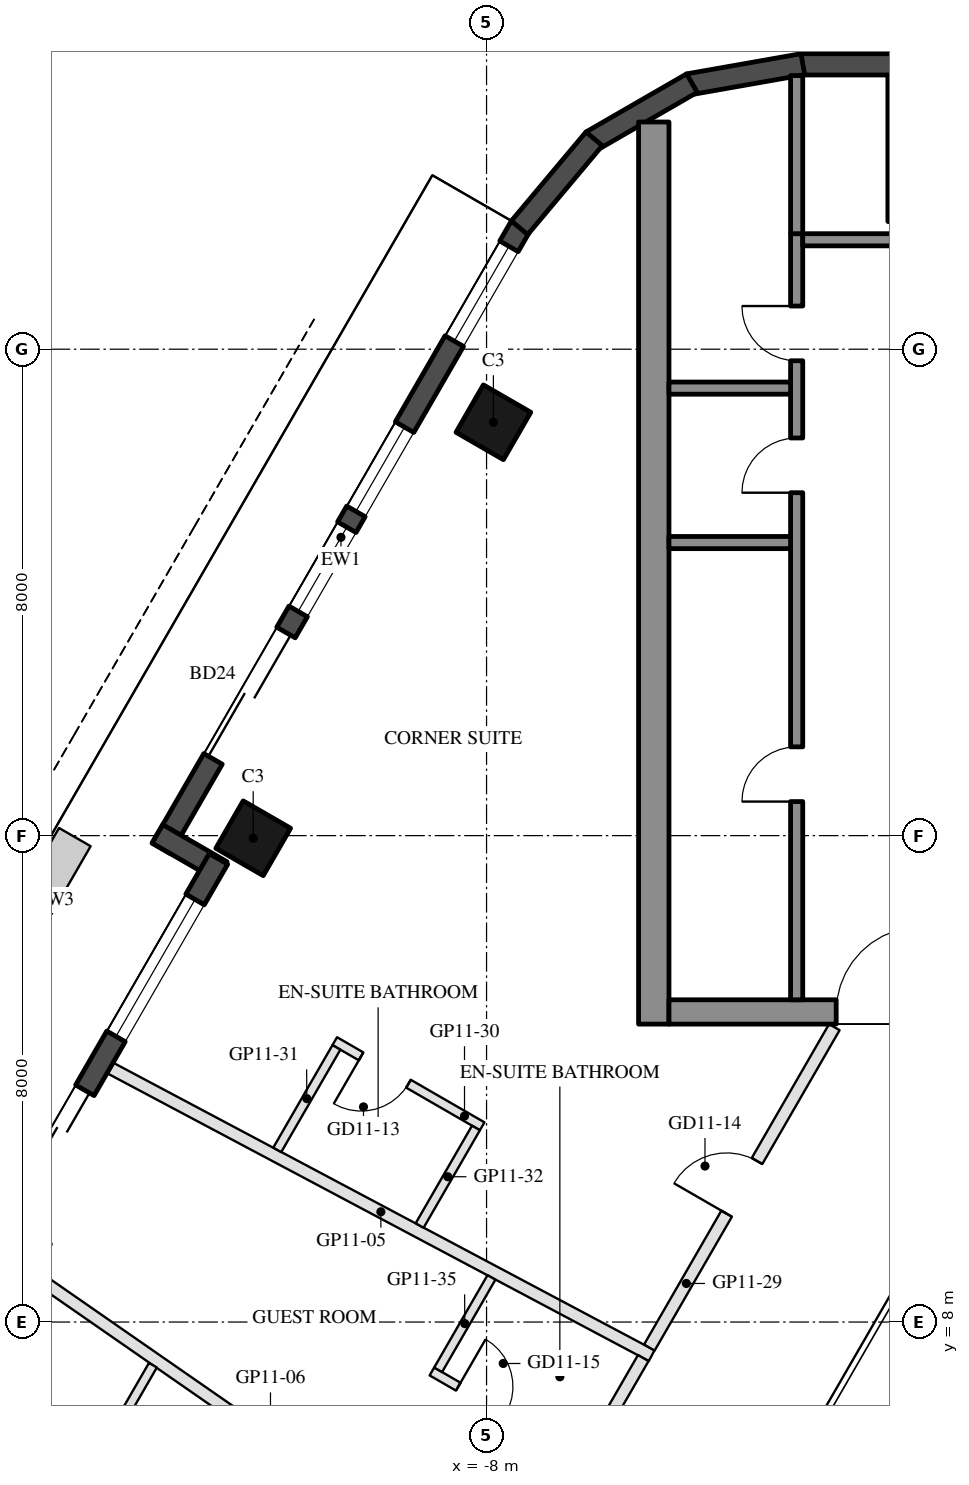
"""IFC4 building model, lengths in metres.
Left out: names, types, materials, properties, quantities, classifications, styles, units other than length and angle.
Written with IfcOpenShell. Run it as: python <this file> out.ifc"""

import sys

from ifc_helpers import new_model, si_unit, direction, frame, frame_2d, origin, origin_2d, place, context, subcontext, project, spatial, rectangle, hollow_rectangle, extrude, element, fill, save


model = new_model("IFC4")
c1 = context("Model", 3, precision=1e-05, world=origin(), true_north=direction((0.0, 1.0)))
c2 = subcontext(c1, "Body", "Model", "MODEL_VIEW")
j1 = project(units=[si_unit("LENGTHUNIT", "METRE"), si_unit("PLANEANGLEUNIT", "RADIAN")], contexts=[c1])
p1 = place(None, origin())
s1 = spatial("IfcSite", under=j1, at=p1, CompositionType="ELEMENT")
p2 = place(p1, origin())
s2 = spatial("IfcBuilding", under=s1, at=p2, CompositionType="ELEMENT")
p3 = place(p2, frame((0.0, 0.0, 124.2)))
s3 = spatial("IfcBuildingStorey", under=s2, at=p3, CompositionType="ELEMENT", Elevation=124.2)
for number, where, z_axis, x_axis in (
    (1, (-7.888, 22.798, 0.0), (0.0, 0.0, 1.0), (0.5, 0.866, 0.0)),
    (2, (-11.838, 15.957, 0.0), (0.0, 0.0, 1.0), (0.5, 0.866, 0.0)),
):
    element("IfcColumn", number, at=place(p3, frame(where, z_axis=z_axis, x_axis=x_axis)), inside=s3, PredefinedType="COLUMN", context=c2, shape_type="SweptSolid", body=[
        extrude(hollow_rectangle(XDim=0.9, YDim=0.9, WallThickness=0.04, at=origin_2d()), origin(), (0.0, 0.0, 1.0), 3.7),
    ])
p4 = place(p3, frame((0.0, 27.3, 0.0), z_axis=(0.0, 0.0, 1.0), x_axis=(1.0, 0.0, 0.0)))
e3 = element("IfcColumn", 3, at=p4, inside=s3, PredefinedType="COLUMN", context=c2, shape_type="SweptSolid", body=[
    extrude(hollow_rectangle(XDim=2.8, YDim=2.4, WallThickness=0.07, at=origin_2d()), origin(), (0.0, 0.0, 1.0), 3.7),
])
p5 = place(p3, frame((-7.441, 26.022, 0.0), z_axis=(0.0, 0.0, 1.0), x_axis=(-0.499992533062, -0.86602971478, 0.0)))
e4 = element("IfcWall", 4, at=p5, inside=s3, PredefinedType="SOLIDWALL", context=c2, shape_type="SweptSolid", body=[
    extrude(rectangle(XDim=11.816, YDim=0.35, at=frame_2d((5.908, 0.0))), origin(), (0.0, 0.0, 1.0), 3.55),
])
p6 = place(p5, frame((0.381, 0.0, 0.3)))
e5 = element("IfcOpeningElement", 5, at=p6, cuts=e4, PredefinedType="OPENING", context=c2, shape_type="SweptSolid", body=[
    extrude(rectangle(XDim=1.8, YDim=2.65, at=frame_2d((0.9, 1.325))), frame((0.0, 0.185, 0.0), z_axis=(0.0, -1.0, 0.0), x_axis=(1.0, 0.0, 0.0)), (0.0, 0.0, 1.0), 0.37),
])
p7 = place(p5, frame((7.716, 0.0, 0.0)))
e6 = element("IfcOpeningElement", 6, at=p7, cuts=e4, PredefinedType="OPENING", context=c2, shape_type="SweptSolid", body=[
    extrude(rectangle(XDim=2.4, YDim=2.4, at=frame_2d((1.2, 1.2))), frame((0.0, 0.185, 0.0), z_axis=(0.0, -1.0, 0.0), x_axis=(1.0, 0.0, 0.0)), (0.0, 0.0, 1.0), 0.37),
])
p8 = place(p5, frame((3.815, 0.0, 0.3)))
e7 = element("IfcOpeningElement", 7, at=p8, cuts=e4, PredefinedType="OPENING", context=c2, shape_type="SweptSolid", body=[
    extrude(rectangle(XDim=1.6, YDim=2.65, at=frame_2d((0.8, 1.325))), frame((0.0, 0.185, 0.0), z_axis=(0.0, -1.0, 0.0), x_axis=(1.0, 0.0, 0.0)), (0.0, 0.0, 1.0), 0.37),
])
p9 = place(p5, frame((5.715, 0.0, 0.3)))
e8 = element("IfcOpeningElement", 8, at=p9, cuts=e4, PredefinedType="OPENING", context=c2, shape_type="SweptSolid", body=[
    extrude(rectangle(XDim=1.6, YDim=2.65, at=frame_2d((0.8, 1.325))), frame((0.0, 0.185, 0.0), z_axis=(0.0, -1.0, 0.0), x_axis=(1.0, 0.0, 0.0)), (0.0, 0.0, 1.0), 0.37),
])
p10 = place(p3, frame((-13.413, 16.029, 0.0), z_axis=(0.0, 0.0, 1.0), x_axis=(0.866005645448, -0.500034220881, 0.0)))
e9 = element("IfcWall", 9, at=p10, inside=s3, PredefinedType="SOLIDWALL", context=c2, shape_type="SweptSolid", body=[
    extrude(rectangle(XDim=1.22, YDim=0.35, at=frame_2d((0.61, 0.0))), origin(), (0.0, 0.0, 1.0), 3.55),
])
p11 = place(p3, frame((-12.409, 15.617, 0.0), z_axis=(0.0, 0.0, 1.0), x_axis=(-0.500003597184, -0.866023326939, 0.0)))
e10 = element("IfcWall", 10, at=p11, inside=s3, PredefinedType="SOLIDWALL", context=c2, shape_type="SweptSolid", body=[
    extrude(rectangle(XDim=6.74, YDim=0.35, at=frame_2d((3.37, 0.0))), origin(), (0.0, 0.0, 1.0), 3.55),
])
p12 = place(p11, frame((0.77, 0.0, 0.3)))
e11 = element("IfcOpeningElement", 11, at=p12, cuts=e10, PredefinedType="OPENING", context=c2, shape_type="SweptSolid", body=[
    extrude(rectangle(XDim=2.6, YDim=2.65, at=frame_2d((1.3, 1.325))), frame((0.0, 0.185, 0.0), z_axis=(0.0, -1.0, 0.0), x_axis=(1.0, 0.0, 0.0)), (0.0, 0.0, 1.0), 0.37),
])
p13 = place(p11, frame((4.394, 0.0, 0.0)))
e12 = element("IfcOpeningElement", 12, at=p13, cuts=e10, PredefinedType="OPENING", context=c2, shape_type="SweptSolid", body=[
    extrude(rectangle(XDim=1.5, YDim=2.4, at=frame_2d((0.75, 1.2))), frame((0.0, 0.185, 0.0), z_axis=(0.0, -1.0, 0.0), x_axis=(1.0, 0.0, 0.0)), (0.0, 0.0, 1.0), 0.37),
])
p14 = place(p3, frame((2.829, 28.685, 0.0), z_axis=(0.0, 0.0, 1.0), x_axis=(-1.0, 0.0, 0.0)))
e13 = element("IfcWall", 13, at=p14, inside=s3, PredefinedType="SOLIDWALL", context=c2, shape_type="SweptSolid", body=[
    extrude(rectangle(XDim=5.658, YDim=0.35, at=frame_2d((2.829, 0.0))), origin(), (0.0, 0.0, 1.0), 3.55),
])
for number, where, z_axis, x_axis in (
    (14, (-2.799, 28.688, 0.0), (0.0, 0.0, 1.0), (-0.985, -0.174, 0.0)),
    (15, (-4.623, 28.377, 0.0), (0.0, 0.0, 1.0), (-0.866, -0.5, 0.0)),
):
    element("IfcWall", number, at=place(p3, frame(where, z_axis=z_axis, x_axis=x_axis)), inside=s3, PredefinedType="SOLIDWALL", context=c2, shape_type="SweptSolid", body=[
        extrude(rectangle(XDim=1.91, YDim=0.35, at=frame_2d((0.955, 0.0))), origin(), (0.0, 0.0, 1.0), 3.55),
    ])
p15 = place(p3, frame((-6.23, 27.461, 0.0), z_axis=(0.0, 0.0, 1.0), x_axis=(-0.642808304945, -0.766027077259, 0.0)))
e16 = element("IfcWall", 16, at=p15, inside=s3, PredefinedType="SOLIDWALL", context=c2, shape_type="SweptSolid", body=[
    extrude(rectangle(XDim=1.91, YDim=0.35, at=frame_2d((0.955, 0.0))), origin(), (0.0, 0.0, 1.0), 3.55),
])
p16 = place(p3, frame((-5.25, 12.9, 0.0), z_axis=(0.0, 0.0, 1.0), x_axis=(0.0, 1.0, 0.0)))
e17 = element("IfcWall", 17, at=p16, inside=s3, PredefinedType="SHEAR", context=c2, shape_type="SweptSolid", body=[
    extrude(rectangle(XDim=14.837, YDim=0.5, at=frame_2d((7.418, 0.0))), origin(), (0.0, 0.0, 1.0), 3.5),
])
p17 = place(p3, frame((5.0, 13.1, 0.0), z_axis=(0.0, 0.0, 1.0), x_axis=(-1.0, 0.0, 0.0)))
e18 = element("IfcWall", 18, at=p17, inside=s3, PredefinedType="SHEAR", context=c2, shape_type="SweptSolid", body=[
    extrude(rectangle(XDim=10.0, YDim=0.4, at=frame_2d((5.0, 0.0))), origin(), (0.0, 0.0, 1.0), 3.5),
])
p18 = place(p17, frame((3.55, 0.0, 0.0)))
e19 = element("IfcOpeningElement", 19, at=p18, cuts=e18, PredefinedType="OPENING", context=c2, shape_type="SweptSolid", body=[
    extrude(rectangle(XDim=1.1, YDim=2.1, at=frame_2d((0.55, 1.05))), frame((0.0, 0.21, 0.0), z_axis=(0.0, -1.0, 0.0), x_axis=(1.0, 0.0, 0.0)), (0.0, 0.0, 1.0), 0.42),
])
p19 = place(p17, frame((5.85, 0.0, 0.0)))
e20 = element("IfcOpeningElement", 20, at=p19, cuts=e18, PredefinedType="OPENING", context=c2, shape_type="SweptSolid", body=[
    extrude(rectangle(XDim=1.4, YDim=2.1, at=frame_2d((0.7, 1.05))), frame((0.0, 0.21, 0.0), z_axis=(0.0, -1.0, 0.0), x_axis=(1.0, 0.0, 0.0)), (0.0, 0.0, 1.0), 0.42),
])
p20 = place(p3, frame((-2.9, 13.3, 0.0), z_axis=(0.0, 0.0, 1.0), x_axis=(0.0, 1.0, 0.0)))
e21 = element("IfcWall", 21, at=p20, inside=s3, PredefinedType="SHEAR", context=c2, shape_type="SweptSolid", body=[
    extrude(rectangle(XDim=12.6, YDim=0.2, at=frame_2d((6.3, 0.0))), origin(), (0.0, 0.0, 1.0), 3.5),
])
p21 = place(p20, frame((3.26, 0.0, 0.0)))
e22 = element("IfcOpeningElement", 22, at=p21, cuts=e21, PredefinedType="OPENING", context=c2, shape_type="SweptSolid", body=[
    extrude(rectangle(XDim=0.9, YDim=2.1, at=frame_2d((0.45, 1.05))), frame((0.0, 0.11, 0.0), z_axis=(0.0, -1.0, 0.0), x_axis=(1.0, 0.0, 0.0)), (0.0, 0.0, 1.0), 0.22),
])
p22 = place(p20, frame((8.34, 0.0, 0.0)))
e23 = element("IfcOpeningElement", 23, at=p22, cuts=e21, PredefinedType="OPENING", context=c2, shape_type="SweptSolid", body=[
    extrude(rectangle(XDim=0.9, YDim=2.1, at=frame_2d((0.45, 1.05))), frame((0.0, 0.11, 0.0), z_axis=(0.0, -1.0, 0.0), x_axis=(1.0, 0.0, 0.0)), (0.0, 0.0, 1.0), 0.22),
])
p23 = place(p20, frame((10.51, 0.0, 0.0)))
e24 = element("IfcOpeningElement", 24, at=p23, cuts=e21, PredefinedType="OPENING", context=c2, shape_type="SweptSolid", body=[
    extrude(rectangle(XDim=0.9, YDim=2.1, at=frame_2d((0.45, 1.05))), frame((0.0, 0.11, 0.0), z_axis=(0.0, -1.0, 0.0), x_axis=(1.0, 0.0, 0.0)), (0.0, 0.0, 1.0), 0.22),
])
p24 = place(p3, frame((-0.4, 25.8, 0.0), z_axis=(0.0, 0.0, 1.0), x_axis=(-1.0, 0.0, 0.0)))
e25 = element("IfcWall", 25, at=p24, inside=s3, PredefinedType="SHEAR", context=c2, shape_type="SweptSolid", body=[
    extrude(rectangle(XDim=2.4, YDim=0.2, at=frame_2d((1.2, 0.0))), origin(), (0.0, 0.0, 1.0), 3.5),
])
for number, where, z_axis, x_axis in (
    (26, (-3.0, 20.82, 0.0), (0.0, 0.0, 1.0), (-1.0, 0.0, 0.0)),
    (27, (-3.0, 23.36, 0.0), (0.0, 0.0, 1.0), (-1.0, 0.0, 0.0)),
):
    element("IfcWall", number, at=place(p3, frame(where, z_axis=z_axis, x_axis=x_axis)), inside=s3, PredefinedType="SHEAR", context=c2, shape_type="SweptSolid", body=[
        extrude(rectangle(XDim=2.0, YDim=0.2, at=frame_2d((1.0, 0.0))), origin(), (0.0, 0.0, 1.0), 3.5),
    ])
p25 = place(p3, frame((-2.9, 25.9, 0.0), z_axis=(0.0, 0.0, 1.0), x_axis=(0.0, 1.0, 0.0)))
e28 = element("IfcWall", 28, at=p25, inside=s3, PredefinedType="SHEAR", context=c2, shape_type="SweptSolid", body=[
    extrude(rectangle(XDim=2.6, YDim=0.2, at=frame_2d((1.3, 0.0))), origin(), (0.0, 0.0, 1.0), 3.5),
])
p26 = place(p3, frame((-14.192, 12.179, 0.0), z_axis=(0.0, 0.0, 1.0), x_axis=(0.883106944183, -0.469171743753, 0.0)))
e29 = element("IfcWall", 29, at=p26, inside=s3, PredefinedType="PARTITIONING", context=c2, shape_type="SweptSolid", body=[
    extrude(rectangle(XDim=10.086, YDim=0.2, at=frame_2d((5.043, 0.0))), origin(), (0.0, 0.0, 1.0), 2.95),
])
p27 = place(p3, frame((-15.46, 8.781, 0.0), z_axis=(0.0, 0.0, 1.0), x_axis=(0.82142273434, -0.570319815113, 0.0)))
e30 = element("IfcWall", 30, at=p27, inside=s3, PredefinedType="PARTITIONING", context=c2, shape_type="SweptSolid", body=[
    extrude(rectangle(XDim=9.513, YDim=0.2, at=frame_2d((4.756, 0.0))), origin(), (0.0, 0.0, 1.0), 2.95),
])
p28 = place(p3, frame((-5.323, 7.581, 0.0), z_axis=(0.0, 0.0, 1.0), x_axis=(0.49998410452, 0.866034580849, 0.0)))
e31 = element("IfcWall", 31, at=p28, inside=s3, PredefinedType="PARTITIONING", context=c2, shape_type="SweptSolid", body=[
    extrude(rectangle(XDim=6.085, YDim=0.2, at=frame_2d((3.042, 0.0))), origin(), (0.0, 0.0, 1.0), 2.95),
])
p29 = place(p28, frame((2.542, 0.0, 0.0)))
e32 = element("IfcOpeningElement", 32, at=p29, cuts=e31, PredefinedType="OPENING", context=c2, shape_type="SweptSolid", body=[
    extrude(rectangle(XDim=1.0, YDim=2.1, at=frame_2d((0.5, 1.05))), frame((0.0, 0.11, 0.0), z_axis=(0.0, -1.0, 0.0), x_axis=(1.0, 0.0, 0.0)), (0.0, 0.0, 1.0), 0.22),
])
p30 = place(p3, frame((-8.072, 11.219, 0.0), z_axis=(0.0, 0.0, 1.0), x_axis=(-0.866034573852, 0.49998411664, 0.0)))
e33 = element("IfcWall", 33, at=p30, inside=s3, PredefinedType="PARTITIONING", context=c2, shape_type="SweptSolid", body=[
    extrude(rectangle(XDim=2.8, YDim=0.15, at=frame_2d((1.4, 0.0))), origin(), (0.0, 0.0, 1.0), 3.55),
])
p31 = place(p30, frame((1.4, 0.0, 0.0)))
e34 = element("IfcOpeningElement", 34, at=p31, cuts=e33, PredefinedType="OPENING", context=c2, shape_type="SweptSolid", body=[
    extrude(rectangle(XDim=0.9, YDim=2.1, at=frame_2d((0.45, 1.05))), frame((0.0, 0.085, 0.0), z_axis=(0.0, -1.0, 0.0), x_axis=(1.0, 0.0, 0.0)), (0.0, 0.0, 1.0), 0.17),
])
p32 = place(p3, frame((-10.469, 12.517, 0.0), z_axis=(0.0, 0.0, 1.0), x_axis=(-0.500051850797, -0.865995465643, 0.0)))
e35 = element("IfcWall", 35, at=p32, inside=s3, PredefinedType="PARTITIONING", context=c2, shape_type="SweptSolid", body=[
    extrude(rectangle(XDim=1.946, YDim=0.15, at=frame_2d((0.973, 0.0))), origin(), (0.0, 0.0, 1.0), 2.95),
])
p33 = place(p3, frame((-8.174, 11.192, 0.0), z_axis=(0.0, 0.0, 1.0), x_axis=(-0.500022870649, -0.866012199007, 0.0)))
e36 = element("IfcWall", 36, at=p33, inside=s3, PredefinedType="PARTITIONING", context=c2, shape_type="SweptSolid", body=[
    extrude(rectangle(XDim=1.853, YDim=0.15, at=frame_2d((0.926, 0.0))), origin(), (0.0, 0.0, 1.0), 2.95),
])
p34 = place(p3, frame((-7.679, 3.5, 0.0), z_axis=(0.0, 0.0, 1.0), x_axis=(0.500026934738, 0.866009852448, 0.0)))
e37 = element("IfcWall", 37, at=p34, inside=s3, PredefinedType="PARTITIONING", context=c2, shape_type="SweptSolid", body=[
    extrude(rectangle(XDim=4.511, YDim=0.2, at=frame_2d((2.256, 0.0))), origin(), (0.0, 0.0, 1.0), 2.95),
])
p35 = place(p34, frame((1.058, 0.0, 0.0)))
e38 = element("IfcOpeningElement", 38, at=p35, cuts=e37, PredefinedType="OPENING", context=c2, shape_type="SweptSolid", body=[
    extrude(rectangle(XDim=1.0, YDim=2.1, at=frame_2d((0.5, 1.05))), frame((0.0, 0.11, 0.0), z_axis=(0.0, -1.0, 0.0), x_axis=(1.0, 0.0, 0.0)), (0.0, 0.0, 1.0), 0.22),
])
p36 = place(p3, frame((-8.899, 7.187, 0.0), z_axis=(0.0, 0.0, 1.0), x_axis=(0.866056369097, -0.49994636267, 0.0)))
e39 = element("IfcWall", 39, at=p36, inside=s3, PredefinedType="PARTITIONING", context=c2, shape_type="SweptSolid", body=[
    extrude(rectangle(XDim=2.8, YDim=0.15, at=frame_2d((1.4, 0.0))), origin(), (0.0, 0.0, 1.0), 3.55),
])
p37 = place(p36, frame((0.5, 0.0, 0.0)))
e40 = element("IfcOpeningElement", 40, at=p37, cuts=e39, PredefinedType="OPENING", context=c2, shape_type="SweptSolid", body=[
    extrude(rectangle(XDim=0.9, YDim=2.1, at=frame_2d((0.45, 1.05))), frame((0.0, 0.085, 0.0), z_axis=(0.0, -1.0, 0.0), x_axis=(1.0, 0.0, 0.0)), (0.0, 0.0, 1.0), 0.17),
])
p38 = place(p3, frame((-7.919, 8.734, 0.0), z_axis=(0.0, 0.0, 1.0), x_axis=(-0.499971461383, -0.866041879935, 0.0)))
e41 = element("IfcWall", 41, at=p38, inside=s3, PredefinedType="PARTITIONING", context=c2, shape_type="SweptSolid", body=[
    extrude(rectangle(XDim=1.754, YDim=0.15, at=frame_2d((0.877, 0.0))), origin(), (0.0, 0.0, 1.0), 3.55),
])
p39 = place(p3, frame((-13.487, 7.29, 0.0), z_axis=(0.0, 0.0, 1.0), x_axis=(-0.500044586128, -0.865999660441, 0.0)))
e42 = element("IfcWall", 42, at=p39, inside=s3, PredefinedType="PARTITIONING", context=c2, shape_type="SweptSolid", body=[
    extrude(rectangle(XDim=2.077, YDim=0.15, at=frame_2d((1.039, 0.0))), origin(), (0.0, 0.0, 1.0), 3.55),
])
p40 = place(p6, origin())
e43 = element("IfcWindow", 43, at=p40, inside=s3, PartitioningType="SINGLE_PANEL", PredefinedType="WINDOW", context=c2, shape_type="SweptSolid", body=[
    extrude(rectangle(XDim=1.8, YDim=2.65, at=frame_2d((0.9, 1.325))), frame((0.0, 0.03, 0.0), z_axis=(0.0, -1.0, 0.0), x_axis=(1.0, 0.0, 0.0)), (0.0, 0.0, 1.0), 0.06),
])
fill(e5, e43)
p41 = place(p7, frame((2.4, 0.0, 0.0), z_axis=(0.0, 0.0, 1.0), x_axis=(-1.0, 0.0, 0.0)))
e44 = element("IfcDoor", 44, at=p41, inside=s3, OperationType="SLIDING_TO_LEFT", PredefinedType="DOOR", context=c2, shape_type="SweptSolid", body=[
    extrude(rectangle(XDim=2.4, YDim=2.4, at=frame_2d((1.2, 1.2))), frame((0.0, 0.025, 0.0), z_axis=(0.0, -1.0, 0.0), x_axis=(1.0, 0.0, 0.0)), (0.0, 0.0, 1.0), 0.05),
])
fill(e6, e44)
p42 = place(p8, origin())
e45 = element("IfcWindow", 45, at=p42, inside=s3, PartitioningType="SINGLE_PANEL", PredefinedType="WINDOW", context=c2, shape_type="SweptSolid", body=[
    extrude(rectangle(XDim=1.6, YDim=2.65, at=frame_2d((0.8, 1.325))), frame((0.0, 0.03, 0.0), z_axis=(0.0, -1.0, 0.0), x_axis=(1.0, 0.0, 0.0)), (0.0, 0.0, 1.0), 0.06),
])
fill(e7, e45)
p43 = place(p9, origin())
e46 = element("IfcWindow", 46, at=p43, inside=s3, PartitioningType="SINGLE_PANEL", PredefinedType="WINDOW", context=c2, shape_type="SweptSolid", body=[
    extrude(rectangle(XDim=1.6, YDim=2.65, at=frame_2d((0.8, 1.325))), frame((0.0, 0.03, 0.0), z_axis=(0.0, -1.0, 0.0), x_axis=(1.0, 0.0, 0.0)), (0.0, 0.0, 1.0), 0.06),
])
fill(e8, e46)
p44 = place(p12, origin())
e47 = element("IfcWindow", 47, at=p44, inside=s3, PartitioningType="SINGLE_PANEL", PredefinedType="WINDOW", context=c2, shape_type="SweptSolid", body=[
    extrude(rectangle(XDim=2.6, YDim=2.65, at=frame_2d((1.3, 1.325))), frame((0.0, 0.03, 0.0), z_axis=(0.0, -1.0, 0.0), x_axis=(1.0, 0.0, 0.0)), (0.0, 0.0, 1.0), 0.06),
])
fill(e11, e47)
p45 = place(p13, frame((1.5, 0.0, 0.0), z_axis=(0.0, 0.0, 1.0), x_axis=(-1.0, 0.0, 0.0)))
e48 = element("IfcDoor", 48, at=p45, inside=s3, OperationType="SLIDING_TO_LEFT", PredefinedType="DOOR", context=c2, shape_type="SweptSolid", body=[
    extrude(rectangle(XDim=1.5, YDim=2.4, at=frame_2d((0.75, 1.2))), frame((0.0, 0.025, 0.0), z_axis=(0.0, -1.0, 0.0), x_axis=(1.0, 0.0, 0.0)), (0.0, 0.0, 1.0), 0.05),
])
fill(e12, e48)
p46 = place(p21, origin())
e49 = element("IfcDoor", 49, at=p46, inside=s3, OperationType="SINGLE_SWING_LEFT", PredefinedType="DOOR", context=c2, shape_type="SweptSolid", body=[
    extrude(rectangle(XDim=0.9, YDim=2.1, at=frame_2d((0.45, 1.05))), frame((0.0, 0.025, 0.0), z_axis=(0.0, -1.0, 0.0), x_axis=(1.0, 0.0, 0.0)), (0.0, 0.0, 1.0), 0.05),
])
fill(e22, e49)
p47 = place(p22, origin())
e50 = element("IfcDoor", 50, at=p47, inside=s3, OperationType="SINGLE_SWING_LEFT", PredefinedType="DOOR", context=c2, shape_type="SweptSolid", body=[
    extrude(rectangle(XDim=0.9, YDim=2.1, at=frame_2d((0.45, 1.05))), frame((0.0, 0.025, 0.0), z_axis=(0.0, -1.0, 0.0), x_axis=(1.0, 0.0, 0.0)), (0.0, 0.0, 1.0), 0.05),
])
fill(e23, e50)
p48 = place(p23, origin())
e51 = element("IfcDoor", 51, at=p48, inside=s3, OperationType="SINGLE_SWING_RIGHT", PredefinedType="DOOR", context=c2, shape_type="SweptSolid", body=[
    extrude(rectangle(XDim=0.9, YDim=2.1, at=frame_2d((0.45, 1.05))), frame((0.0, 0.025, 0.0), z_axis=(0.0, -1.0, 0.0), x_axis=(1.0, 0.0, 0.0)), (0.0, 0.0, 1.0), 0.05),
])
fill(e24, e51)
p49 = place(p19, frame((1.4, 0.0, 0.0), z_axis=(0.0, 0.0, 1.0), x_axis=(-1.0, 0.0, 0.0)))
e52 = element("IfcDoor", 52, at=p49, inside=s3, OperationType="DOUBLE_DOOR_SINGLE_SWING", PredefinedType="DOOR", context=c2, shape_type="SweptSolid", body=[
    extrude(rectangle(XDim=1.4, YDim=2.1, at=frame_2d((0.7, 1.05))), frame((0.0, 0.025, 0.0), z_axis=(0.0, -1.0, 0.0), x_axis=(1.0, 0.0, 0.0)), (0.0, 0.0, 1.0), 0.05),
])
fill(e20, e52)
p50 = place(p31, origin())
e53 = element("IfcDoor", 53, at=p50, inside=s3, OperationType="SINGLE_SWING_RIGHT", PredefinedType="DOOR", context=c2, shape_type="SweptSolid", body=[
    extrude(rectangle(XDim=0.9, YDim=2.1, at=frame_2d((0.45, 1.05))), frame((0.0, 0.025, 0.0), z_axis=(0.0, -1.0, 0.0), x_axis=(1.0, 0.0, 0.0)), (0.0, 0.0, 1.0), 0.05),
])
fill(e34, e53)
p51 = place(p29, origin())
e54 = element("IfcDoor", 54, at=p51, inside=s3, OperationType="SINGLE_SWING_LEFT", PredefinedType="DOOR", context=c2, shape_type="SweptSolid", body=[
    extrude(rectangle(XDim=1.0, YDim=2.1, at=frame_2d((0.5, 1.05))), frame((0.0, 0.025, 0.0), z_axis=(0.0, -1.0, 0.0), x_axis=(1.0, 0.0, 0.0)), (0.0, 0.0, 1.0), 0.05),
])
fill(e32, e54)
p52 = place(p37, origin())
e55 = element("IfcDoor", 55, at=p52, inside=s3, OperationType="SINGLE_SWING_LEFT", PredefinedType="DOOR", context=c2, shape_type="SweptSolid", body=[
    extrude(rectangle(XDim=0.9, YDim=2.1, at=frame_2d((0.45, 1.05))), frame((0.0, 0.025, 0.0), z_axis=(0.0, -1.0, 0.0), x_axis=(1.0, 0.0, 0.0)), (0.0, 0.0, 1.0), 0.05),
])
fill(e40, e55)
save(model, sys.argv[1])
